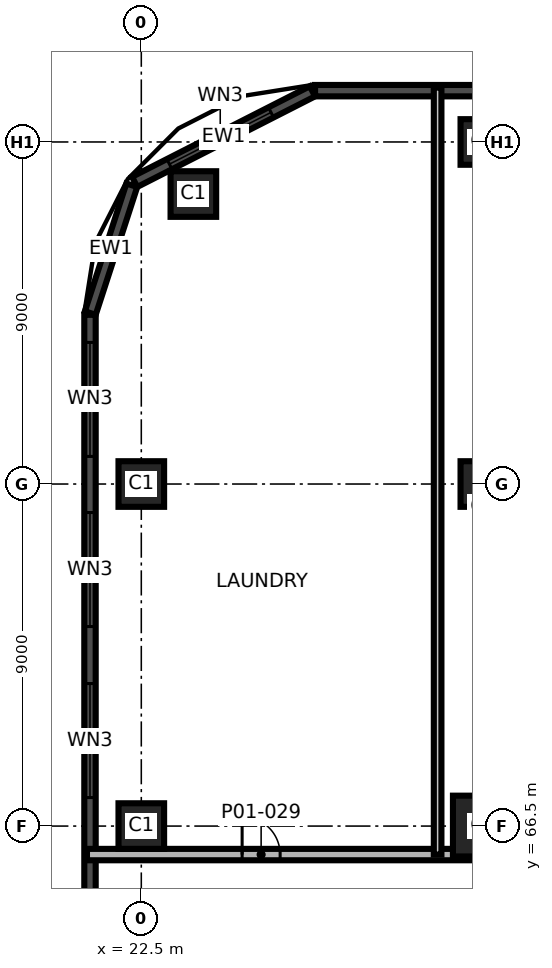
"""IFC4 building model, lengths in metres.
Left out: names, types, materials, properties, quantities, classifications, styles, units other than length and angle.
Written with IfcOpenShell. Run it as: python <this file> out.ifc"""

import sys

from ifc_helpers import new_model, si_unit, direction, frame, frame_2d, origin, origin_2d, place, context, subcontext, project, spatial, rectangle, extrude, element, fill, save


model = new_model("IFC4")
c1 = context("Model", 3, precision=1e-05, world=origin(), true_north=direction((0.0, 1.0)))
c2 = subcontext(c1, "Body", "Model", "MODEL_VIEW")
j1 = project(units=[si_unit("LENGTHUNIT", "METRE"), si_unit("PLANEANGLEUNIT", "RADIAN")], contexts=[c1])
p1 = place(None, origin())
s1 = spatial("IfcSite", under=j1, at=p1, CompositionType="ELEMENT")
p2 = place(p1, origin())
s2 = spatial("IfcBuilding", under=s1, at=p2, CompositionType="ELEMENT")
p3 = place(p2, frame((0.0, 0.0, 8.0)))
s3 = spatial("IfcBuildingStorey", under=s2, at=p3, CompositionType="ELEMENT", Elevation=8.0)
p4 = place(p3, frame((22.5, 66.5, 0.0), z_axis=(0.0, 0.0, 1.0), x_axis=(1.0, 0.0, 0.0)))
e1 = element("IfcColumn", 1, at=p4, inside=s3, PredefinedType="COLUMN", context=c2, shape_type="SweptSolid", body=[
    extrude(rectangle(XDim=1.2, YDim=1.2, at=origin_2d()), origin(), (0.0, 0.0, 1.0), 5.5),
])
p5 = place(p3, frame((31.5, 66.5, 0.0), z_axis=(0.0, 0.0, 1.0), x_axis=(1.0, 0.0, 0.0)))
e2 = element("IfcColumn", 2, at=p5, inside=s3, PredefinedType="COLUMN", context=c2, shape_type="SweptSolid", body=[
    extrude(rectangle(XDim=1.6, YDim=1.6, at=origin_2d()), origin(), (0.0, 0.0, 1.0), 5.5),
])
for number, where, z_axis, x_axis in (
    (3, (22.5, 75.5, 0.0), (0.0, 0.0, 1.0), (1.0, 0.0, 0.0)),
    (4, (31.5, 75.5, 0.0), (0.0, 0.0, 1.0), (1.0, 0.0, 0.0)),
    (5, (23.87, 83.13, 0.0), (0.0, 0.0, 1.0), (1.0, 0.0, 0.0)),
    (6, (31.5, 84.5, 0.0), (0.0, 0.0, 1.0), (1.0, 0.0, 0.0)),
):
    element("IfcColumn", number, at=place(p3, frame(where, z_axis=z_axis, x_axis=x_axis)), inside=s3, PredefinedType="COLUMN", context=c2, shape_type="SweptSolid", body=[
        extrude(rectangle(XDim=1.2, YDim=1.2, at=origin_2d()), origin(), (0.0, 0.0, 1.0), 5.5),
    ])
p6 = place(p3, frame((53.952, 85.85, 0.0), z_axis=(0.0, 0.0, 1.0), x_axis=(-1.0, 0.0, 0.0)))
e7 = element("IfcWall", 7, at=p6, inside=s3, PredefinedType="SOLIDWALL", context=c2, shape_type="SweptSolid", body=[
    extrude(rectangle(XDim=26.88, YDim=0.3, at=frame_2d((13.44, 0.0))), origin(), (0.0, 0.0, 1.0), 5.2),
])
p7 = place(p6, frame((5.202, 0.0, 0.9)))
e8 = element("IfcOpeningElement", 8, at=p7, cuts=e7, PredefinedType="OPENING", context=c2, shape_type="SweptSolid", body=[
    extrude(rectangle(XDim=3.0, YDim=2.4, at=frame_2d((1.5, 1.2))), frame((0.0, 0.16, 0.0), z_axis=(0.0, -1.0, 0.0), x_axis=(1.0, 0.0, 0.0)), (0.0, 0.0, 1.0), 0.32),
])
p8 = place(p6, frame((9.702, 0.0, 0.9)))
e9 = element("IfcOpeningElement", 9, at=p8, cuts=e7, PredefinedType="OPENING", context=c2, shape_type="SweptSolid", body=[
    extrude(rectangle(XDim=3.0, YDim=2.4, at=frame_2d((1.5, 1.2))), frame((0.0, 0.16, 0.0), z_axis=(0.0, -1.0, 0.0), x_axis=(1.0, 0.0, 0.0)), (0.0, 0.0, 1.0), 0.32),
])
p9 = place(p6, frame((18.702, 0.0, 0.9)))
e10 = element("IfcOpeningElement", 10, at=p9, cuts=e7, PredefinedType="OPENING", context=c2, shape_type="SweptSolid", body=[
    extrude(rectangle(XDim=3.0, YDim=2.4, at=frame_2d((1.5, 1.2))), frame((0.0, 0.16, 0.0), z_axis=(0.0, -1.0, 0.0), x_axis=(1.0, 0.0, 0.0)), (0.0, 0.0, 1.0), 0.32),
])
p10 = place(p3, frame((27.004, 85.834, 0.0), z_axis=(0.0, 0.0, 1.0), x_axis=(-0.890998339455, -0.454006562826, 0.0)))
e11 = element("IfcWall", 11, at=p10, inside=s3, PredefinedType="SOLIDWALL", context=c2, shape_type="SweptSolid", body=[
    extrude(rectangle(XDim=5.252, YDim=0.3, at=frame_2d((2.626, 0.0))), origin(), (0.0, 0.0, 1.0), 5.2),
])
p11 = place(p10, frame((1.224, 0.0, 0.9)))
e12 = element("IfcOpeningElement", 12, at=p11, cuts=e11, PredefinedType="OPENING", context=c2, shape_type="SweptSolid", body=[
    extrude(rectangle(XDim=3.0, YDim=2.4, at=frame_2d((1.5, 1.2))), frame((0.0, 0.16, 0.0), z_axis=(0.0, -1.0, 0.0), x_axis=(1.0, 0.0, 0.0)), (0.0, 0.0, 1.0), 0.32),
])
p12 = place(p3, frame((22.25, 83.362, 0.0), z_axis=(0.0, 0.0, 1.0), x_axis=(-0.309073584194, -0.951038127287, 0.0)))
e13 = element("IfcWall", 13, at=p12, inside=s3, PredefinedType="SOLIDWALL", context=c2, shape_type="SweptSolid", body=[
    extrude(rectangle(XDim=3.536, YDim=0.3, at=frame_2d((1.768, 0.0))), origin(), (0.0, 0.0, 1.0), 5.2),
])
p13 = place(p3, frame((21.15, 79.952, 0.0), z_axis=(0.0, 0.0, 1.0), x_axis=(0.0, -1.0, 0.0)))
e14 = element("IfcWall", 14, at=p13, inside=s3, PredefinedType="SOLIDWALL", context=c2, shape_type="SweptSolid", body=[
    extrude(rectangle(XDim=62.88, YDim=0.3, at=frame_2d((31.44, 0.0))), origin(), (0.0, 0.0, 1.0), 5.2),
])
p14 = place(p13, frame((0.726, 0.0, 0.9)))
e15 = element("IfcOpeningElement", 15, at=p14, cuts=e14, PredefinedType="OPENING", context=c2, shape_type="SweptSolid", body=[
    extrude(rectangle(XDim=3.0, YDim=2.4, at=frame_2d((1.5, 1.2))), frame((0.0, 0.16, 0.0), z_axis=(0.0, -1.0, 0.0), x_axis=(1.0, 0.0, 0.0)), (0.0, 0.0, 1.0), 0.32),
])
p15 = place(p13, frame((5.202, 0.0, 0.9)))
e16 = element("IfcOpeningElement", 16, at=p15, cuts=e14, PredefinedType="OPENING", context=c2, shape_type="SweptSolid", body=[
    extrude(rectangle(XDim=3.0, YDim=2.4, at=frame_2d((1.5, 1.2))), frame((0.0, 0.16, 0.0), z_axis=(0.0, -1.0, 0.0), x_axis=(1.0, 0.0, 0.0)), (0.0, 0.0, 1.0), 0.32),
])
p16 = place(p13, frame((9.702, 0.0, 0.9)))
e17 = element("IfcOpeningElement", 17, at=p16, cuts=e14, PredefinedType="OPENING", context=c2, shape_type="SweptSolid", body=[
    extrude(rectangle(XDim=3.0, YDim=2.4, at=frame_2d((1.5, 1.2))), frame((0.0, 0.16, 0.0), z_axis=(0.0, -1.0, 0.0), x_axis=(1.0, 0.0, 0.0)), (0.0, 0.0, 1.0), 0.32),
])
p17 = place(p13, frame((18.702, 0.0, 0.9)))
e18 = element("IfcOpeningElement", 18, at=p17, cuts=e14, PredefinedType="OPENING", context=c2, shape_type="SweptSolid", body=[
    extrude(rectangle(XDim=3.0, YDim=2.4, at=frame_2d((1.5, 1.2))), frame((0.0, 0.16, 0.0), z_axis=(0.0, -1.0, 0.0), x_axis=(1.0, 0.0, 0.0)), (0.0, 0.0, 1.0), 0.32),
])
p18 = place(p13, frame((32.202, 0.0, 0.9)))
e19 = element("IfcOpeningElement", 19, at=p18, cuts=e14, PredefinedType="OPENING", context=c2, shape_type="SweptSolid", body=[
    extrude(rectangle(XDim=3.0, YDim=2.4, at=frame_2d((1.5, 1.2))), frame((0.0, 0.16, 0.0), z_axis=(0.0, -1.0, 0.0), x_axis=(1.0, 0.0, 0.0)), (0.0, 0.0, 1.0), 0.32),
])
p19 = place(p13, frame((41.202, 0.0, 0.9)))
e20 = element("IfcOpeningElement", 20, at=p19, cuts=e14, PredefinedType="OPENING", context=c2, shape_type="SweptSolid", body=[
    extrude(rectangle(XDim=3.0, YDim=2.4, at=frame_2d((1.5, 1.2))), frame((0.0, 0.16, 0.0), z_axis=(0.0, -1.0, 0.0), x_axis=(1.0, 0.0, 0.0)), (0.0, 0.0, 1.0), 0.32),
])
p20 = place(p13, frame((45.702, 0.0, 0.9)))
e21 = element("IfcOpeningElement", 21, at=p20, cuts=e14, PredefinedType="OPENING", context=c2, shape_type="SweptSolid", body=[
    extrude(rectangle(XDim=3.0, YDim=2.4, at=frame_2d((1.5, 1.2))), frame((0.0, 0.16, 0.0), z_axis=(0.0, -1.0, 0.0), x_axis=(1.0, 0.0, 0.0)), (0.0, 0.0, 1.0), 0.32),
])
p21 = place(p13, frame((50.202, 0.0, 0.9)))
e22 = element("IfcOpeningElement", 22, at=p21, cuts=e14, PredefinedType="OPENING", context=c2, shape_type="SweptSolid", body=[
    extrude(rectangle(XDim=3.0, YDim=2.4, at=frame_2d((1.5, 1.2))), frame((0.0, 0.16, 0.0), z_axis=(0.0, -1.0, 0.0), x_axis=(1.0, 0.0, 0.0)), (0.0, 0.0, 1.0), 0.32),
])
p22 = place(p13, frame((54.702, 0.0, 0.9)))
e23 = element("IfcOpeningElement", 23, at=p22, cuts=e14, PredefinedType="OPENING", context=c2, shape_type="SweptSolid", body=[
    extrude(rectangle(XDim=3.0, YDim=2.4, at=frame_2d((1.5, 1.2))), frame((0.0, 0.16, 0.0), z_axis=(0.0, -1.0, 0.0), x_axis=(1.0, 0.0, 0.0)), (0.0, 0.0, 1.0), 0.32),
])
p23 = place(p13, frame((59.226, 0.0, 0.9)))
e24 = element("IfcOpeningElement", 24, at=p23, cuts=e14, PredefinedType="OPENING", context=c2, shape_type="SweptSolid", body=[
    extrude(rectangle(XDim=3.0, YDim=2.4, at=frame_2d((1.5, 1.2))), frame((0.0, 0.16, 0.0), z_axis=(0.0, -1.0, 0.0), x_axis=(1.0, 0.0, 0.0)), (0.0, 0.0, 1.0), 0.32),
])
p24 = place(p3, frame((21.07, 65.75, 0.0), z_axis=(0.0, 0.0, 1.0), x_axis=(1.0, 0.0, 0.0)))
e25 = element("IfcWall", 25, at=p24, inside=s3, PredefinedType="SHEAR", context=c2, shape_type="SweptSolid", body=[
    extrude(rectangle(XDim=38.86, YDim=0.3, at=frame_2d((19.43, 0.0))), origin(), (0.0, 0.0, 1.0), 5.2),
])
p25 = place(p24, frame((20.68, 0.0, 0.0)))
e26 = element("IfcOpeningElement", 26, at=p25, cuts=e25, PredefinedType="OPENING", context=c2, shape_type="SweptSolid", body=[
    extrude(rectangle(XDim=1.2, YDim=2.1, at=frame_2d((0.6, 1.05))), frame((0.0, 0.16, 0.0), z_axis=(0.0, -1.0, 0.0), x_axis=(1.0, 0.0, 0.0)), (0.0, 0.0, 1.0), 0.32),
])
p26 = place(p24, frame((25.839, 0.0, 0.0)))
e27 = element("IfcOpeningElement", 27, at=p26, cuts=e25, PredefinedType="OPENING", context=c2, shape_type="SweptSolid", body=[
    extrude(rectangle(XDim=1.0, YDim=2.1, at=frame_2d((0.5, 1.05))), frame((0.0, 0.16, 0.0), z_axis=(0.0, -1.0, 0.0), x_axis=(1.0, 0.0, 0.0)), (0.0, 0.0, 1.0), 0.32),
])
p27 = place(p24, frame((4.083, 0.0, 0.0)))
e28 = element("IfcOpeningElement", 28, at=p27, cuts=e25, PredefinedType="OPENING", context=c2, shape_type="SweptSolid", body=[
    extrude(rectangle(XDim=1.0, YDim=2.1, at=frame_2d((0.5, 1.05))), frame((0.0, 0.16, 0.0), z_axis=(0.0, -1.0, 0.0), x_axis=(1.0, 0.0, 0.0)), (0.0, 0.0, 1.0), 0.32),
])
p28 = place(p24, frame((12.632, 0.0, 0.0)))
e29 = element("IfcOpeningElement", 29, at=p28, cuts=e25, PredefinedType="OPENING", context=c2, shape_type="SweptSolid", body=[
    extrude(rectangle(XDim=1.0, YDim=2.1, at=frame_2d((0.5, 1.05))), frame((0.0, 0.16, 0.0), z_axis=(0.0, -1.0, 0.0), x_axis=(1.0, 0.0, 0.0)), (0.0, 0.0, 1.0), 0.32),
])
p29 = place(p24, frame((33.578, 0.0, 0.0)))
e30 = element("IfcOpeningElement", 30, at=p29, cuts=e25, PredefinedType="OPENING", context=c2, shape_type="SweptSolid", body=[
    extrude(rectangle(XDim=1.0, YDim=2.1, at=frame_2d((0.5, 1.05))), frame((0.0, 0.16, 0.0), z_axis=(0.0, -1.0, 0.0), x_axis=(1.0, 0.0, 0.0)), (0.0, 0.0, 1.0), 0.32),
])
p30 = place(p3, frame((30.297, 65.75, 0.0), z_axis=(0.0, 0.0, 1.0), x_axis=(0.0, 1.0, 0.0)))
e31 = element("IfcWall", 31, at=p30, inside=s3, PredefinedType="PARTITIONING", context=c2, shape_type="SweptSolid", body=[
    extrude(rectangle(XDim=20.18, YDim=0.2, at=frame_2d((10.09, 0.0))), origin(), (0.0, 0.0, 1.0), 5.2),
])
p31 = place(p11, origin())
e32 = element("IfcWindow", 32, at=p31, inside=s3, PartitioningType="SINGLE_PANEL", PredefinedType="WINDOW", context=c2, shape_type="SweptSolid", body=[
    extrude(rectangle(XDim=3.0, YDim=2.4, at=frame_2d((1.5, 1.2))), frame((0.0, 0.03, 0.0), z_axis=(0.0, -1.0, 0.0), x_axis=(1.0, 0.0, 0.0)), (0.0, 0.0, 1.0), 0.06),
])
fill(e12, e32)
p32 = place(p14, origin())
e33 = element("IfcWindow", 33, at=p32, inside=s3, PartitioningType="SINGLE_PANEL", PredefinedType="WINDOW", context=c2, shape_type="SweptSolid", body=[
    extrude(rectangle(XDim=3.0, YDim=2.4, at=frame_2d((1.5, 1.2))), frame((0.0, 0.03, 0.0), z_axis=(0.0, -1.0, 0.0), x_axis=(1.0, 0.0, 0.0)), (0.0, 0.0, 1.0), 0.06),
])
fill(e15, e33)
p33 = place(p15, origin())
e34 = element("IfcWindow", 34, at=p33, inside=s3, PartitioningType="SINGLE_PANEL", PredefinedType="WINDOW", context=c2, shape_type="SweptSolid", body=[
    extrude(rectangle(XDim=3.0, YDim=2.4, at=frame_2d((1.5, 1.2))), frame((0.0, 0.03, 0.0), z_axis=(0.0, -1.0, 0.0), x_axis=(1.0, 0.0, 0.0)), (0.0, 0.0, 1.0), 0.06),
])
fill(e16, e34)
p34 = place(p16, origin())
e35 = element("IfcWindow", 35, at=p34, inside=s3, PartitioningType="SINGLE_PANEL", PredefinedType="WINDOW", context=c2, shape_type="SweptSolid", body=[
    extrude(rectangle(XDim=3.0, YDim=2.4, at=frame_2d((1.5, 1.2))), frame((0.0, 0.03, 0.0), z_axis=(0.0, -1.0, 0.0), x_axis=(1.0, 0.0, 0.0)), (0.0, 0.0, 1.0), 0.06),
])
fill(e17, e35)
p35 = place(p27, origin())
e36 = element("IfcDoor", 36, at=p35, inside=s3, OperationType="SINGLE_SWING_LEFT", PredefinedType="DOOR", context=c2, shape_type="SweptSolid", body=[
    extrude(rectangle(XDim=1.0, YDim=2.1, at=frame_2d((0.5, 1.05))), frame((0.0, 0.025, 0.0), z_axis=(0.0, -1.0, 0.0), x_axis=(1.0, 0.0, 0.0)), (0.0, 0.0, 1.0), 0.05),
])
fill(e28, e36)
save(model, sys.argv[1])
